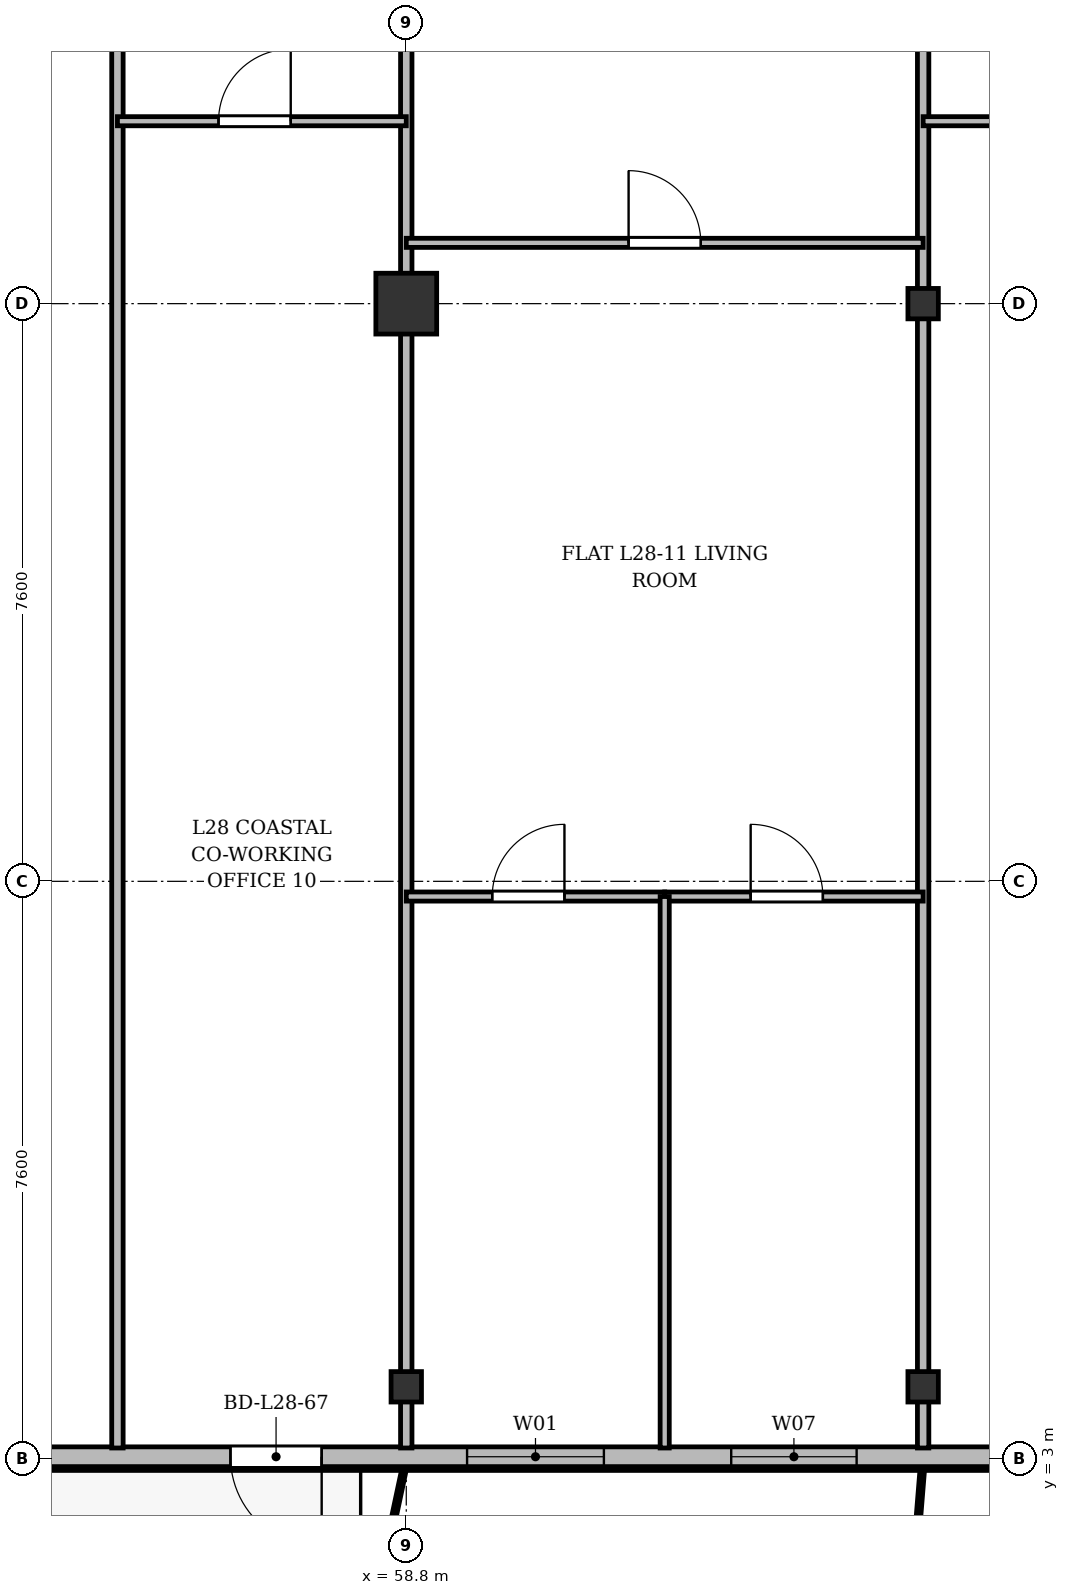
"""IFC4 building model, lengths in metres.
Left out: names, types, materials, properties, quantities, classifications, styles, units other than length and angle.
Written with IfcOpenShell. Run it as: python <this file> out.ifc"""

import sys

from ifc_helpers import new_model, si_unit, direction, frame, frame_2d, origin, origin_2d, place, context, subcontext, project, spatial, rectangle, i_section, extrude, source, transform, mapped, element, fill, save


model = new_model("IFC4")
c1 = context("Model", 3, precision=1e-05, world=origin(), true_north=direction((0.0, 1.0)))
c2 = subcontext(c1, "Body", "Model", "MODEL_VIEW")
j1 = project(units=[si_unit("LENGTHUNIT", "METRE"), si_unit("PLANEANGLEUNIT", "RADIAN")], contexts=[c1])
p1 = place(None, origin())
s1 = spatial("IfcSite", under=j1, at=p1, CompositionType="ELEMENT")
p2 = place(p1, origin())
s2 = spatial("IfcBuilding", under=s1, at=p2, CompositionType="ELEMENT")
p3 = place(p2, frame((0.0, 0.0, 110.5)))
s3 = spatial("IfcBuildingStorey", under=s2, at=p3, CompositionType="ELEMENT", Elevation=110.5)
m1 = source(origin(), c2, "Body", "SweptSolid", [
    extrude(i_section(OverallWidth=0.4, OverallDepth=0.4, WebThickness=0.022, FlangeThickness=0.035, at=origin_2d()), origin(), (0.0, 0.0, 1.0), 3.6),
])
p4 = place(p3, frame((58.8, 3.95, 0.0), z_axis=(0.0, 0.0, 1.0), x_axis=(1.0, 0.0, 0.0)))
e1 = element("IfcColumn", 1, at=p4, inside=s3, PredefinedType="COLUMN", context=c2, shape_type="MappedRepresentation", body=[
    mapped(m1, transform((0.0, 0.0, 0.0), x_axis=(1.0, 0.0, 0.0), y_axis=(0.0, 1.0, 0.0), z_axis=(0.0, 0.0, 1.0), scale=1.0)),
])
m2 = source(origin(), c2, "Body", "SweptSolid", [
    extrude(rectangle(XDim=0.8, YDim=0.8, at=origin_2d()), origin(), (0.0, 0.0, 1.0), 3.6),
])
p5 = place(p3, frame((58.8, 18.2, 0.0), z_axis=(0.0, 0.0, 1.0), x_axis=(1.0, 0.0, 0.0)))
e2 = element("IfcColumn", 2, at=p5, inside=s3, PredefinedType="COLUMN", context=c2, shape_type="MappedRepresentation", body=[
    mapped(m2, transform((0.0, 0.0, 0.0), x_axis=(1.0, 0.0, 0.0), y_axis=(0.0, 1.0, 0.0), z_axis=(0.0, 0.0, 1.0), scale=1.0)),
])
for number, where, z_axis, x_axis in (
    (3, (65.6, 3.95, 0.0), (0.0, 0.0, 1.0), (1.0, 0.0, 0.0)),
    (4, (65.6, 18.2, 0.0), (0.0, 0.0, 1.0), (1.0, 0.0, 0.0)),
):
    element("IfcColumn", number, at=place(p3, frame(where, z_axis=z_axis, x_axis=x_axis)), inside=s3, PredefinedType="COLUMN", context=c2, shape_type="MappedRepresentation", body=[
        mapped(m1, transform((0.0, 0.0, 0.0), x_axis=(1.0, 0.0, 0.0), y_axis=(0.0, 1.0, 0.0), z_axis=(0.0, 0.0, 1.0), scale=1.0)),
    ])
p6 = place(p3, frame((66.9, 3.03, 0.0), z_axis=(0.0, 0.0, 1.0), x_axis=(-1.0, 0.0, 0.0)))
e5 = element("IfcWall", 5, at=p6, inside=s3, PredefinedType="SOLIDWALL", context=c2, shape_type="SweptSolid", body=[
    extrude(rectangle(XDim=59.4, YDim=0.26, at=frame_2d((29.7, 0.0))), origin(), (0.0, 0.0, 1.0), 3.34),
])
p7 = place(p6, frame((2.175, 0.0, 0.9)))
e6 = element("IfcOpeningElement", 6, at=p7, cuts=e5, PredefinedType="OPENING", context=c2, shape_type="SweptSolid", body=[
    extrude(rectangle(XDim=1.65, YDim=1.85, at=frame_2d((0.825, 0.925))), frame((0.0, 0.14, 0.0), z_axis=(0.0, -1.0, 0.0), x_axis=(1.0, 0.0, 0.0)), (0.0, 0.0, 1.0), 0.28),
])
p8 = place(p6, frame((5.5, 0.0, 0.9)))
e7 = element("IfcOpeningElement", 7, at=p8, cuts=e5, PredefinedType="OPENING", context=c2, shape_type="SweptSolid", body=[
    extrude(rectangle(XDim=1.8, YDim=1.8, at=frame_2d((0.9, 0.9))), frame((0.0, 0.14, 0.0), z_axis=(0.0, -1.0, 0.0), x_axis=(1.0, 0.0, 0.0)), (0.0, 0.0, 1.0), 0.28),
])
p9 = place(p6, frame((9.213, 0.0, 0.0)))
e8 = element("IfcOpeningElement", 8, at=p9, cuts=e5, PredefinedType="OPENING", context=c2, shape_type="SweptSolid", body=[
    extrude(rectangle(XDim=1.2, YDim=2.2, at=frame_2d((0.6, 1.1))), frame((0.0, 0.14, 0.0), z_axis=(0.0, -1.0, 0.0), x_axis=(1.0, 0.0, 0.0)), (0.0, 0.0, 1.0), 0.28),
])
p10 = place(p6, frame((13.15, 0.0, 0.9)))
e9 = element("IfcOpeningElement", 9, at=p10, cuts=e5, PredefinedType="OPENING", context=c2, shape_type="SweptSolid", body=[
    extrude(rectangle(XDim=1.5, YDim=1.75, at=frame_2d((0.75, 0.875))), frame((0.0, 0.14, 0.0), z_axis=(0.0, -1.0, 0.0), x_axis=(1.0, 0.0, 0.0)), (0.0, 0.0, 1.0), 0.28),
])
p11 = place(p6, frame((16.7, 0.0, 0.9)))
e10 = element("IfcOpeningElement", 10, at=p11, cuts=e5, PredefinedType="OPENING", context=c2, shape_type="SweptSolid", body=[
    extrude(rectangle(XDim=2.0, YDim=1.95, at=frame_2d((1.0, 0.975))), frame((0.0, 0.14, 0.0), z_axis=(0.0, -1.0, 0.0), x_axis=(1.0, 0.0, 0.0)), (0.0, 0.0, 1.0), 0.28),
])
p12 = place(p6, frame((20.475, 0.0, 0.9)))
e11 = element("IfcOpeningElement", 11, at=p12, cuts=e5, PredefinedType="OPENING", context=c2, shape_type="SweptSolid", body=[
    extrude(rectangle(XDim=1.65, YDim=1.85, at=frame_2d((0.825, 0.925))), frame((0.0, 0.14, 0.0), z_axis=(0.0, -1.0, 0.0), x_axis=(1.0, 0.0, 0.0)), (0.0, 0.0, 1.0), 0.28),
])
p13 = place(p6, frame((25.5, 0.0, 0.9)))
e12 = element("IfcOpeningElement", 12, at=p13, cuts=e5, PredefinedType="OPENING", context=c2, shape_type="SweptSolid", body=[
    extrude(rectangle(XDim=1.8, YDim=1.8, at=frame_2d((0.9, 0.9))), frame((0.0, 0.14, 0.0), z_axis=(0.0, -1.0, 0.0), x_axis=(1.0, 0.0, 0.0)), (0.0, 0.0, 1.0), 0.28),
])
p14 = place(p6, frame((31.9, 0.0, 0.9)))
e13 = element("IfcOpeningElement", 13, at=p14, cuts=e5, PredefinedType="OPENING", context=c2, shape_type="SweptSolid", body=[
    extrude(rectangle(XDim=2.2, YDim=1.8, at=frame_2d((1.1, 0.9))), frame((0.0, 0.14, 0.0), z_axis=(0.0, -1.0, 0.0), x_axis=(1.0, 0.0, 0.0)), (0.0, 0.0, 1.0), 0.28),
])
p15 = place(p6, frame((37.584, 0.0, 0.0)))
e14 = element("IfcOpeningElement", 14, at=p15, cuts=e5, PredefinedType="OPENING", context=c2, shape_type="SweptSolid", body=[
    extrude(rectangle(XDim=1.2, YDim=2.2, at=frame_2d((0.6, 1.1))), frame((0.0, 0.14, 0.0), z_axis=(0.0, -1.0, 0.0), x_axis=(1.0, 0.0, 0.0)), (0.0, 0.0, 1.0), 0.28),
])
p16 = place(p6, frame((40.6, 0.0, 0.9)))
e15 = element("IfcOpeningElement", 15, at=p16, cuts=e5, PredefinedType="OPENING", context=c2, shape_type="SweptSolid", body=[
    extrude(rectangle(XDim=2.0, YDim=1.95, at=frame_2d((1.0, 0.975))), frame((0.0, 0.14, 0.0), z_axis=(0.0, -1.0, 0.0), x_axis=(1.0, 0.0, 0.0)), (0.0, 0.0, 1.0), 0.28),
])
p17 = place(p6, frame((46.575, 0.0, 0.9)))
e16 = element("IfcOpeningElement", 16, at=p17, cuts=e5, PredefinedType="OPENING", context=c2, shape_type="SweptSolid", body=[
    extrude(rectangle(XDim=1.65, YDim=1.85, at=frame_2d((0.825, 0.925))), frame((0.0, 0.14, 0.0), z_axis=(0.0, -1.0, 0.0), x_axis=(1.0, 0.0, 0.0)), (0.0, 0.0, 1.0), 0.28),
])
p18 = place(p6, frame((55.817, 0.0, 0.0)))
e17 = element("IfcOpeningElement", 17, at=p18, cuts=e5, PredefinedType="OPENING", context=c2, shape_type="SweptSolid", body=[
    extrude(rectangle(XDim=1.2, YDim=2.2, at=frame_2d((0.6, 1.1))), frame((0.0, 0.14, 0.0), z_axis=(0.0, -1.0, 0.0), x_axis=(1.0, 0.0, 0.0)), (0.0, 0.0, 1.0), 0.28),
])
p19 = place(p3, frame((55.0, 3.145, 0.0), z_axis=(0.0, 0.0, 1.0), x_axis=(0.0, 1.0, 0.0)))
e18 = element("IfcWall", 18, at=p19, inside=s3, PredefinedType="PARTITIONING", context=c2, shape_type="SweptSolid", body=[
    extrude(rectangle(XDim=24.455, YDim=0.15, at=frame_2d((12.228, 0.0))), origin(), (0.0, 0.0, 1.0), 2.752),
])
for number, where, z_axis, x_axis in (
    (19, (58.8, 3.145, 0.0), (0.0, 0.0, 1.0), (0.0, 1.0, 0.0)),
    (20, (65.6, 3.145, 0.0), (0.0, 0.0, 1.0), (0.0, 1.0, 0.0)),
):
    element("IfcWall", number, at=place(p3, frame(where, z_axis=z_axis, x_axis=x_axis)), inside=s3, PredefinedType="PARTITIONING", context=c2, shape_type="SweptSolid", body=[
        extrude(rectangle(XDim=24.455, YDim=0.15, at=frame_2d((12.228, 0.0))), origin(), (0.0, 0.0, 1.0), 2.84),
    ])
p20 = place(p3, frame((55.0, 20.6, 0.0), z_axis=(0.0, 0.0, 1.0), x_axis=(1.0, 0.0, 0.0)))
e21 = element("IfcWall", 21, at=p20, inside=s3, PredefinedType="PARTITIONING", context=c2, shape_type="SweptSolid", body=[
    extrude(rectangle(XDim=3.8, YDim=0.12, at=frame_2d((1.9, 0.0))), origin(), (0.0, 0.0, 1.0), 2.84),
])
p21 = place(p20, frame((1.33, 0.0, 0.0)))
e22 = element("IfcOpeningElement", 22, at=p21, cuts=e21, PredefinedType="OPENING", context=c2, shape_type="SweptSolid", body=[
    extrude(rectangle(XDim=0.95, YDim=2.15, at=frame_2d((0.475, 1.075))), frame((0.0, 0.07, 0.0), z_axis=(0.0, -1.0, 0.0), x_axis=(1.0, 0.0, 0.0)), (0.0, 0.0, 1.0), 0.14),
])
p22 = place(p3, frame((58.8, 19.0, 0.0), z_axis=(0.0, 0.0, 1.0), x_axis=(1.0, 0.0, 0.0)))
e23 = element("IfcWall", 23, at=p22, inside=s3, PredefinedType="PARTITIONING", context=c2, shape_type="SweptSolid", body=[
    extrude(rectangle(XDim=6.8, YDim=0.12, at=frame_2d((3.4, 0.0))), origin(), (0.0, 0.0, 1.0), 2.84),
])
p23 = place(p22, frame((2.925, 0.0, 0.0)))
e24 = element("IfcOpeningElement", 24, at=p23, cuts=e23, PredefinedType="OPENING", context=c2, shape_type="SweptSolid", body=[
    extrude(rectangle(XDim=0.95, YDim=2.15, at=frame_2d((0.475, 1.075))), frame((0.0, 0.07, 0.0), z_axis=(0.0, -1.0, 0.0), x_axis=(1.0, 0.0, 0.0)), (0.0, 0.0, 1.0), 0.14),
])
p24 = place(p3, frame((58.8, 10.4, 0.0), z_axis=(0.0, 0.0, 1.0), x_axis=(1.0, 0.0, 0.0)))
e25 = element("IfcWall", 25, at=p24, inside=s3, PredefinedType="PARTITIONING", context=c2, shape_type="SweptSolid", body=[
    extrude(rectangle(XDim=3.4, YDim=0.12, at=frame_2d((1.7, 0.0))), origin(), (0.0, 0.0, 1.0), 2.84),
])
p25 = place(p24, frame((1.131, 0.0, 0.0)))
e26 = element("IfcOpeningElement", 26, at=p25, cuts=e25, PredefinedType="OPENING", context=c2, shape_type="SweptSolid", body=[
    extrude(rectangle(XDim=0.95, YDim=2.15, at=frame_2d((0.475, 1.075))), frame((0.0, 0.07, 0.0), z_axis=(0.0, -1.0, 0.0), x_axis=(1.0, 0.0, 0.0)), (0.0, 0.0, 1.0), 0.14),
])
p26 = place(p3, frame((62.2, 10.4, 0.0), z_axis=(0.0, 0.0, 1.0), x_axis=(1.0, 0.0, 0.0)))
e27 = element("IfcWall", 27, at=p26, inside=s3, PredefinedType="PARTITIONING", context=c2, shape_type="SweptSolid", body=[
    extrude(rectangle(XDim=3.4, YDim=0.12, at=frame_2d((1.7, 0.0))), origin(), (0.0, 0.0, 1.0), 2.84),
])
p27 = place(p26, frame((1.131, 0.0, 0.0)))
e28 = element("IfcOpeningElement", 28, at=p27, cuts=e27, PredefinedType="OPENING", context=c2, shape_type="SweptSolid", body=[
    extrude(rectangle(XDim=0.95, YDim=2.15, at=frame_2d((0.475, 1.075))), frame((0.0, 0.07, 0.0), z_axis=(0.0, -1.0, 0.0), x_axis=(1.0, 0.0, 0.0)), (0.0, 0.0, 1.0), 0.14),
])
p28 = place(p3, frame((62.2, 3.145, 0.0), z_axis=(0.0, 0.0, 1.0), x_axis=(0.0, 1.0, 0.0)))
e29 = element("IfcWall", 29, at=p28, inside=s3, PredefinedType="PARTITIONING", context=c2, shape_type="SweptSolid", body=[
    extrude(rectangle(XDim=7.255, YDim=0.12, at=frame_2d((3.627, 0.0))), origin(), (0.0, 0.0, 1.0), 2.752),
])
p29 = place(p3, frame((65.6, 20.6, 0.0), z_axis=(0.0, 0.0, 1.0), x_axis=(1.0, 0.0, 0.0)))
e30 = element("IfcWall", 30, at=p29, inside=s3, PredefinedType="PARTITIONING", context=c2, shape_type="SweptSolid", body=[
    extrude(rectangle(XDim=4.055, YDim=0.12, at=frame_2d((2.027, 0.0))), origin(), (0.0, 0.0, 1.0), 2.84),
])
p30 = place(p29, frame((1.462, 0.0, 0.0)))
e31 = element("IfcOpeningElement", 31, at=p30, cuts=e30, PredefinedType="OPENING", context=c2, shape_type="SweptSolid", body=[
    extrude(rectangle(XDim=0.95, YDim=2.15, at=frame_2d((0.475, 1.075))), frame((0.0, 0.07, 0.0), z_axis=(0.0, -1.0, 0.0), x_axis=(1.0, 0.0, 0.0)), (0.0, 0.0, 1.0), 0.14),
])
m3 = source(origin(), c2, "Body", "SweptSolid", [
    extrude(rectangle(XDim=1.65, YDim=1.85, at=frame_2d((0.825, 0.925))), frame((0.0, 0.03, 0.0), z_axis=(0.0, -1.0, 0.0), x_axis=(1.0, 0.0, 0.0)), (0.0, 0.0, 1.0), 0.06),
])
p31 = place(p7, origin())
e32 = element("IfcWindow", 32, at=p31, inside=s3, PartitioningType="SINGLE_PANEL", PredefinedType="WINDOW", context=c2, shape_type="MappedRepresentation", body=[
    mapped(m3, transform((0.0, 0.0, 0.0), x_axis=(1.0, 0.0, 0.0), y_axis=(0.0, 1.0, 0.0), z_axis=(0.0, 0.0, 1.0), scale=1.0)),
])
fill(e6, e32)
m4 = source(origin(), c2, "Body", "SweptSolid", [
    extrude(rectangle(XDim=1.8, YDim=1.8, at=frame_2d((0.9, 0.9))), frame((0.0, 0.03, 0.0), z_axis=(0.0, -1.0, 0.0), x_axis=(1.0, 0.0, 0.0)), (0.0, 0.0, 1.0), 0.06),
])
p32 = place(p8, origin())
e33 = element("IfcWindow", 33, at=p32, inside=s3, PartitioningType="SINGLE_PANEL", PredefinedType="WINDOW", context=c2, shape_type="MappedRepresentation", body=[
    mapped(m4, transform((0.0, 0.0, 0.0), x_axis=(1.0, 0.0, 0.0), y_axis=(0.0, 1.0, 0.0), z_axis=(0.0, 0.0, 1.0), scale=1.0)),
])
fill(e7, e33)
m5 = source(origin(), c2, "Body", "SweptSolid", [
    extrude(rectangle(XDim=1.2, YDim=2.2, at=frame_2d((0.6, 1.1))), frame((0.0, 0.025, 0.0), z_axis=(0.0, -1.0, 0.0), x_axis=(1.0, 0.0, 0.0)), (0.0, 0.0, 1.0), 0.05),
])
p33 = place(p9, origin())
e34 = element("IfcDoor", 34, at=p33, inside=s3, OperationType="SINGLE_SWING_LEFT", PredefinedType="DOOR", context=c2, shape_type="MappedRepresentation", body=[
    mapped(m5, transform((0.0, 0.0, 0.0), x_axis=(1.0, 0.0, 0.0), y_axis=(0.0, 1.0, 0.0), z_axis=(0.0, 0.0, 1.0), scale=1.0)),
])
fill(e8, e34)
m6 = source(origin(), c2, "Body", "SweptSolid", [
    extrude(rectangle(XDim=0.95, YDim=2.15, at=frame_2d((0.475, 1.075))), frame((0.0, 0.025, 0.0), z_axis=(0.0, -1.0, 0.0), x_axis=(1.0, 0.0, 0.0)), (0.0, 0.0, 1.0), 0.05),
])
p34 = place(p21, origin())
e35 = element("IfcDoor", 35, at=p34, inside=s3, OperationType="SINGLE_SWING_RIGHT", PredefinedType="DOOR", context=c2, shape_type="MappedRepresentation", body=[
    mapped(m6, transform((0.0, 0.0, 0.0), x_axis=(1.0, 0.0, 0.0), y_axis=(0.0, 1.0, 0.0), z_axis=(0.0, 0.0, 1.0), scale=1.0)),
])
fill(e22, e35)
p35 = place(p23, origin())
e36 = element("IfcDoor", 36, at=p35, inside=s3, OperationType="SINGLE_SWING_LEFT", PredefinedType="DOOR", context=c2, shape_type="MappedRepresentation", body=[
    mapped(m6, transform((0.0, 0.0, 0.0), x_axis=(1.0, 0.0, 0.0), y_axis=(0.0, 1.0, 0.0), z_axis=(0.0, 0.0, 1.0), scale=1.0)),
])
fill(e24, e36)
p36 = place(p25, origin())
e37 = element("IfcDoor", 37, at=p36, inside=s3, OperationType="SINGLE_SWING_RIGHT", PredefinedType="DOOR", context=c2, shape_type="MappedRepresentation", body=[
    mapped(m6, transform((0.0, 0.0, 0.0), x_axis=(1.0, 0.0, 0.0), y_axis=(0.0, 1.0, 0.0), z_axis=(0.0, 0.0, 1.0), scale=1.0)),
])
fill(e26, e37)
p37 = place(p27, origin())
e38 = element("IfcDoor", 38, at=p37, inside=s3, OperationType="SINGLE_SWING_LEFT", PredefinedType="DOOR", context=c2, shape_type="MappedRepresentation", body=[
    mapped(m6, transform((0.0, 0.0, 0.0), x_axis=(1.0, 0.0, 0.0), y_axis=(0.0, 1.0, 0.0), z_axis=(0.0, 0.0, 1.0), scale=1.0)),
])
fill(e28, e38)
save(model, sys.argv[1])
